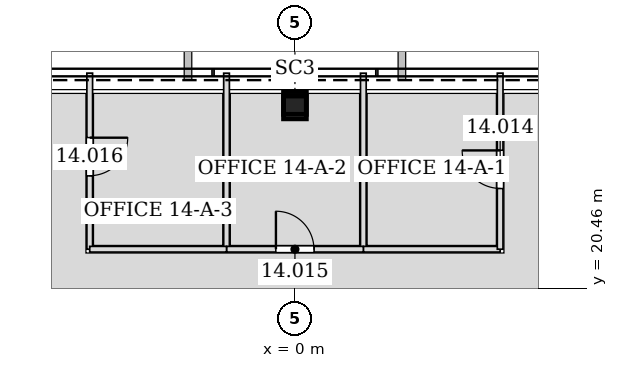
"""IFC4 building model, lengths in metres.
Left out: names, types, materials, properties, quantities, classifications, styles, units other than length and angle.
Written with IfcOpenShell. Run it as: python <this file> out.ifc"""

import sys

from ifc_helpers import new_model, si_unit, direction, frame, frame_2d, origin, origin_2d, place, context, subcontext, project, spatial, rectangle, hollow_rectangle, extrude, element, fill, save


model = new_model("IFC4")
c1 = context("Model", 3, precision=1e-05, world=origin(), true_north=direction((0.0, 1.0)))
c2 = subcontext(c1, "Body", "Model", "MODEL_VIEW")
j1 = project(units=[si_unit("LENGTHUNIT", "METRE"), si_unit("PLANEANGLEUNIT", "RADIAN")], contexts=[c1])
p1 = place(None, origin())
s1 = spatial("IfcSite", under=j1, at=p1, CompositionType="ELEMENT")
p2 = place(p1, origin())
s2 = spatial("IfcBuilding", under=s1, at=p2, CompositionType="ELEMENT")
p3 = place(p2, frame((0.0, 0.0, 66.6)))
s3 = spatial("IfcBuildingStorey", under=s2, at=p3, CompositionType="ELEMENT", Elevation=66.6)
p4 = place(p3, frame((0.0, 25.331, 0.0), z_axis=(0.0, -0.028297679255, 0.99959954049), x_axis=(1.0, 0.0, 0.0)))
e1 = element("IfcColumn", 1, at=p4, inside=s3, PredefinedType="COLUMN", context=c2, shape_type="SweptSolid", body=[
    extrude(hollow_rectangle(XDim=0.6, YDim=0.6, WallThickness=0.032, at=origin_2d()), origin(), (0.0, 0.0, 1.0), 4.202),
])
p5 = place(p3, frame((1.8, 26.113, 0.0), z_axis=(0.0, 0.0, 1.0), x_axis=(0.0, -1.0, 0.0)))
e2 = element("IfcWall", 2, at=p5, inside=s3, PredefinedType="PARTITIONING", context=c2, shape_type="SweptSolid", body=[
    extrude(rectangle(XDim=4.632, YDim=0.15, at=frame_2d((2.316, 0.0))), origin(), (0.0, 0.0, 1.0), 3.423),
])
p6 = place(p3, frame((1.8, 21.481, 0.0), z_axis=(0.0, 0.0, 1.0), x_axis=(1.0, 0.0, 0.0)))
e3 = element("IfcWall", 3, at=p6, inside=s3, PredefinedType="PARTITIONING", context=c2, shape_type="SweptSolid", body=[
    extrude(rectangle(XDim=3.6, YDim=0.15, at=frame_2d((1.8, 0.0))), origin(), (0.0, 0.0, 1.0), 4.035),
])
p7 = place(p3, frame((5.4, 21.481, 0.0), z_axis=(0.0, 0.0, 1.0), x_axis=(0.0, 1.0, 0.0)))
e4 = element("IfcWall", 4, at=p7, inside=s3, PredefinedType="PARTITIONING", context=c2, shape_type="SweptSolid", body=[
    extrude(rectangle(XDim=4.634, YDim=0.15, at=frame_2d((2.317, 0.0))), origin(), (0.0, 0.0, 1.0), 3.423),
])
p8 = place(p7, frame((1.6, 0.0, 0.0)))
e5 = element("IfcOpeningElement", 5, at=p8, cuts=e4, PredefinedType="OPENING", context=c2, shape_type="SweptSolid", body=[
    extrude(rectangle(XDim=1.0, YDim=2.1, at=frame_2d((0.5, 1.05))), frame((0.0, 0.085, 0.0), z_axis=(0.0, -1.0, 0.0), x_axis=(1.0, 0.0, 0.0)), (0.0, 0.0, 1.0), 0.17),
])
p9 = place(p3, frame((-1.8, 26.113, 0.0), z_axis=(0.0, 0.0, 1.0), x_axis=(0.0, -1.0, 0.0)))
e6 = element("IfcWall", 6, at=p9, inside=s3, PredefinedType="PARTITIONING", context=c2, shape_type="SweptSolid", body=[
    extrude(rectangle(XDim=4.632, YDim=0.15, at=frame_2d((2.316, 0.0))), origin(), (0.0, 0.0, 1.0), 3.423),
])
p10 = place(p3, frame((-1.8, 21.481, 0.0), z_axis=(0.0, 0.0, 1.0), x_axis=(1.0, 0.0, 0.0)))
e7 = element("IfcWall", 7, at=p10, inside=s3, PredefinedType="PARTITIONING", context=c2, shape_type="SweptSolid", body=[
    extrude(rectangle(XDim=3.6, YDim=0.15, at=frame_2d((1.8, 0.0))), origin(), (0.0, 0.0, 1.0), 3.065),
])
p11 = place(p10, frame((1.3, 0.0, 0.0)))
e8 = element("IfcOpeningElement", 8, at=p11, cuts=e7, PredefinedType="OPENING", context=c2, shape_type="SweptSolid", body=[
    extrude(rectangle(XDim=1.0, YDim=2.1, at=frame_2d((0.5, 1.05))), frame((0.0, 0.085, 0.0), z_axis=(0.0, -1.0, 0.0), x_axis=(1.0, 0.0, 0.0)), (0.0, 0.0, 1.0), 0.17),
])
p12 = place(p3, frame((-5.4, 26.115, 0.0), z_axis=(0.0, 0.0, 1.0), x_axis=(0.0, -1.0, 0.0)))
e9 = element("IfcWall", 9, at=p12, inside=s3, PredefinedType="PARTITIONING", context=c2, shape_type="SweptSolid", body=[
    extrude(rectangle(XDim=4.634, YDim=0.15, at=frame_2d((2.317, 0.0))), origin(), (0.0, 0.0, 1.0), 3.423),
])
p13 = place(p12, frame((1.699, 0.0, 0.0)))
e10 = element("IfcOpeningElement", 10, at=p13, cuts=e9, PredefinedType="OPENING", context=c2, shape_type="SweptSolid", body=[
    extrude(rectangle(XDim=1.0, YDim=2.1, at=frame_2d((0.5, 1.05))), frame((0.0, 0.085, 0.0), z_axis=(0.0, -1.0, 0.0), x_axis=(1.0, 0.0, 0.0)), (0.0, 0.0, 1.0), 0.17),
])
p14 = place(p3, frame((-5.4, 21.481, 0.0), z_axis=(0.0, 0.0, 1.0), x_axis=(1.0, 0.0, 0.0)))
e11 = element("IfcWall", 11, at=p14, inside=s3, PredefinedType="PARTITIONING", context=c2, shape_type="SweptSolid", body=[
    extrude(rectangle(XDim=3.6, YDim=0.15, at=frame_2d((1.8, 0.0))), origin(), (0.0, 0.0, 1.0), 4.035),
])
p15 = place(p8, origin())
e12 = element("IfcDoor", 12, at=p15, inside=s3, OperationType="SINGLE_SWING_RIGHT", PredefinedType="DOOR", context=c2, shape_type="SweptSolid", body=[
    extrude(rectangle(XDim=1.0, YDim=2.1, at=frame_2d((0.5, 1.05))), frame((0.0, 0.025, 0.0), z_axis=(0.0, -1.0, 0.0), x_axis=(1.0, 0.0, 0.0)), (0.0, 0.0, 1.0), 0.05),
])
fill(e5, e12)
p16 = place(p11, origin())
e13 = element("IfcDoor", 13, at=p16, inside=s3, OperationType="SINGLE_SWING_LEFT", PredefinedType="DOOR", context=c2, shape_type="SweptSolid", body=[
    extrude(rectangle(XDim=1.0, YDim=2.1, at=frame_2d((0.5, 1.05))), frame((0.0, 0.025, 0.0), z_axis=(0.0, -1.0, 0.0), x_axis=(1.0, 0.0, 0.0)), (0.0, 0.0, 1.0), 0.05),
])
fill(e8, e13)
p17 = place(p13, origin())
e14 = element("IfcDoor", 14, at=p17, inside=s3, OperationType="SINGLE_SWING_LEFT", PredefinedType="DOOR", context=c2, shape_type="SweptSolid", body=[
    extrude(rectangle(XDim=1.0, YDim=2.1, at=frame_2d((0.5, 1.05))), frame((0.0, 0.025, 0.0), z_axis=(0.0, -1.0, 0.0), x_axis=(1.0, 0.0, 0.0)), (0.0, 0.0, 1.0), 0.05),
])
fill(e10, e14)
save(model, sys.argv[1])
